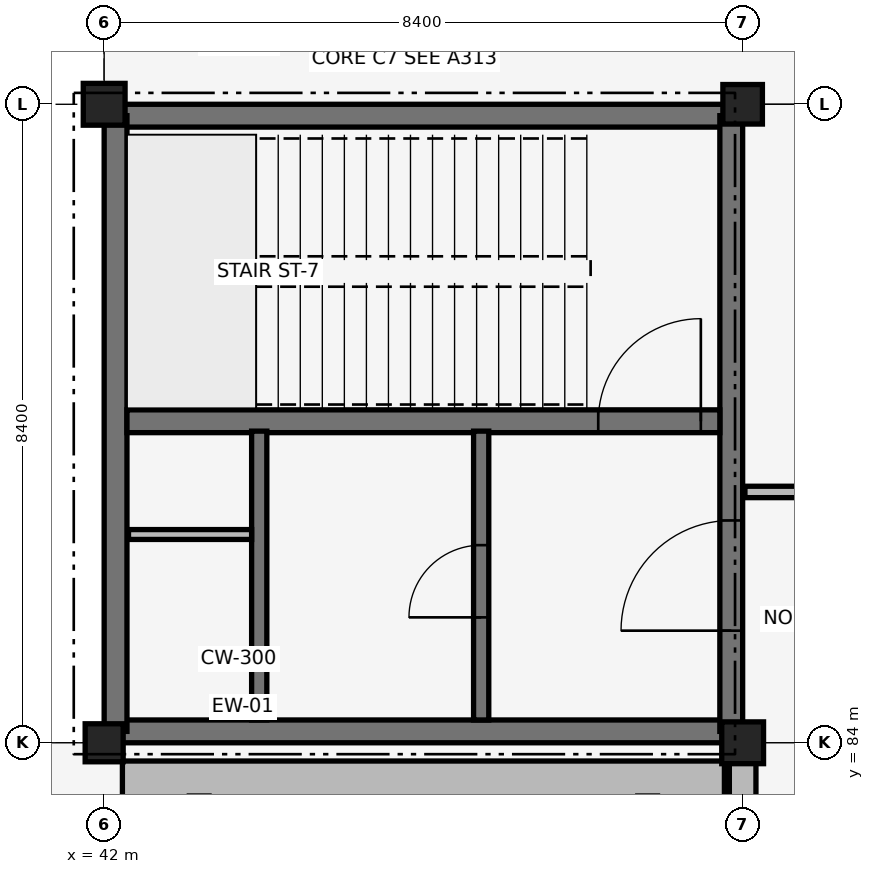
"""IFC4 building model, lengths in metres.
Left out: names, types, materials, properties, quantities, classifications, styles, units other than length and angle.
Written with IfcOpenShell. Run it as: python <this file> out.ifc"""

import sys

from ifc_helpers import new_model, si_unit, direction, frame, frame_2d, origin, origin_2d, place, context, subcontext, project, spatial, polyline, rectangle, outline, extrude, element, fill, save


model = new_model("IFC4")
c1 = context("Model", 3, precision=1e-05, world=origin(), true_north=direction((0.0, 1.0)))
c2 = subcontext(c1, "Body", "Model", "MODEL_VIEW")
j1 = project(units=[si_unit("LENGTHUNIT", "METRE"), si_unit("PLANEANGLEUNIT", "RADIAN")], contexts=[c1])
p1 = place(None, origin())
s1 = spatial("IfcSite", under=j1, at=p1, CompositionType="ELEMENT")
p2 = place(p1, origin())
s2 = spatial("IfcBuilding", under=s1, at=p2, CompositionType="ELEMENT")
p3 = place(p2, origin())
s3 = spatial("IfcBuildingStorey", under=s2, at=p3, CompositionType="ELEMENT", Elevation=0.0)
for number, where, z_axis, x_axis in (
    (1, (42.15, 84.15, 0.0), (0.0, 0.0, 1.0), (1.0, 0.0, 0.0)),
    (2, (42.15, 92.25, 0.0), (0.0, 0.0, 1.0), (1.0, 0.0, 0.0)),
    (3, (42.15, 84.15, 0.0), (0.0, 0.0, 1.0), (0.0, 1.0, 0.0)),
):
    element("IfcWall", number, at=place(p3, frame(where, z_axis=z_axis, x_axis=x_axis)), inside=s3, PredefinedType="SHEAR", context=c2, shape_type="SweptSolid", body=[
        extrude(rectangle(XDim=8.1, YDim=0.3, at=frame_2d((4.05, 0.0))), origin(), (0.0, 0.0, 1.0), 5.14),
    ])
p4 = place(p3, frame((50.25, 84.15, 0.0), z_axis=(0.0, 0.0, 1.0), x_axis=(0.0, 1.0, 0.0)))
e4 = element("IfcWall", 4, at=p4, inside=s3, PredefinedType="SHEAR", context=c2, shape_type="SweptSolid", body=[
    extrude(rectangle(XDim=8.1, YDim=0.3, at=frame_2d((4.05, 0.0))), origin(), (0.0, 0.0, 1.0), 5.14),
])
p5 = place(p4, frame((1.325, 0.0, 0.0)))
e5 = element("IfcOpeningElement", 5, at=p5, cuts=e4, PredefinedType="OPENING", context=c2, shape_type="SweptSolid", body=[
    extrude(rectangle(XDim=1.45, YDim=2.15, at=frame_2d((0.725, 1.075))), frame((0.0, 0.16, 0.0), z_axis=(0.0, -1.0, 0.0), x_axis=(1.0, 0.0, 0.0)), (0.0, 0.0, 1.0), 0.32),
])
p6 = place(p3, frame((42.3, 88.23, 0.0), z_axis=(0.0, 0.0, 1.0), x_axis=(1.0, 0.0, 0.0)))
e6 = element("IfcWall", 6, at=p6, inside=s3, PredefinedType="SHEAR", context=c2, shape_type="SweptSolid", body=[
    extrude(rectangle(XDim=7.8, YDim=0.3, at=frame_2d((3.9, 0.0))), origin(), (0.0, 0.0, 1.0), 5.14),
])
p7 = place(p6, frame((6.2, 0.0, 0.0)))
e7 = element("IfcOpeningElement", 7, at=p7, cuts=e6, PredefinedType="OPENING", context=c2, shape_type="SweptSolid", body=[
    extrude(rectangle(XDim=1.35, YDim=2.15, at=frame_2d((0.675, 1.075))), frame((0.0, 0.16, 0.0), z_axis=(0.0, -1.0, 0.0), x_axis=(1.0, 0.0, 0.0)), (0.0, 0.0, 1.0), 0.32),
])
p8 = place(p3, frame((42.0, 84.0, -0.32), z_axis=(0.0, 0.0, 1.0), x_axis=(1.0, 0.0, 0.0)))
e8 = element("IfcColumn", 8, at=p8, inside=s3, PredefinedType="COLUMN", context=c2, shape_type="SweptSolid", body=[
    extrude(rectangle(XDim=0.5, YDim=0.5, at=origin_2d()), origin(), (0.0, 0.0, 1.0), 5.46),
])
for number, where, z_axis, x_axis in (
    (9, (42.0, 92.4, -0.32), (0.0, 0.0, 1.0), (1.0, 0.0, 0.0)),
    (10, (50.4, 84.0, -0.32), (0.0, 0.0, 1.0), (1.0, 0.0, 0.0)),
):
    element("IfcColumn", number, at=place(p3, frame(where, z_axis=z_axis, x_axis=x_axis)), inside=s3, PredefinedType="COLUMN", context=c2, shape_type="SweptSolid", body=[
        extrude(rectangle(XDim=0.55, YDim=0.55, at=origin_2d()), origin(), (0.0, 0.0, 1.0), 5.46),
    ])
p9 = place(p3, frame((50.4, 92.4, -0.32), z_axis=(0.0, 0.0, 1.0), x_axis=(1.0, 0.0, 0.0)))
e11 = element("IfcColumn", 11, at=p9, inside=s3, PredefinedType="COLUMN", context=c2, shape_type="SweptSolid", body=[
    extrude(rectangle(XDim=0.52, YDim=0.52, at=origin_2d()), origin(), (0.0, 0.0, 1.0), 5.46),
])
p10 = place(p3, frame((50.4, 75.6, 5.145), z_axis=(0.0, 0.0, 1.0), x_axis=(0.0, 1.0, 0.0)))
e12 = element("IfcWall", 12, at=p10, inside=s3, PredefinedType="SOLIDWALL", context=c2, shape_type="SweptSolid", body=[
    extrude(outline(polyline([(0.0, 0.0), (8.4, 0.0), (8.4, 0.25), (4.2, 2.489), (0.0, 0.25), (0.0, 0.0)])), frame((0.0, 0.175, 0.0), z_axis=(0.0, -1.0, 0.0), x_axis=(1.0, 0.0, 0.0)), (0.0, 0.0, 1.0), 0.35),
])
p11 = place(p3, frame((42.24, 83.52, -0.25), z_axis=(0.0, 0.0, 1.0), x_axis=(1.0, 0.0, 0.0)))
e13 = element("IfcWall", 13, at=p11, inside=s3, PredefinedType="SOLIDWALL", context=c2, shape_type="SweptSolid", body=[
    extrude(rectangle(XDim=7.92, YDim=0.48, at=frame_2d((3.96, 0.0))), origin(), (0.0, 0.0, 1.0), 5.69),
])
p12 = place(p3, frame((46.96, 84.3, 0.0), z_axis=(0.0, 0.0, 1.0), x_axis=(0.0, 1.0, 0.0)))
e14 = element("IfcWall", 14, at=p12, inside=s3, PredefinedType="SHEAR", context=c2, shape_type="SweptSolid", body=[
    extrude(rectangle(XDim=3.8, YDim=0.2, at=frame_2d((1.9, 0.0))), origin(), (0.0, 0.0, 1.0), 4.4),
])
p13 = place(p12, frame((1.35, 0.0, 0.0)))
e15 = element("IfcOpeningElement", 15, at=p13, cuts=e14, PredefinedType="OPENING", context=c2, shape_type="SweptSolid", body=[
    extrude(rectangle(XDim=0.95, YDim=2.1, at=frame_2d((0.475, 1.05))), frame((0.0, 0.11, 0.0), z_axis=(0.0, -1.0, 0.0), x_axis=(1.0, 0.0, 0.0)), (0.0, 0.0, 1.0), 0.22),
])
p14 = place(p3, frame((44.04, 84.3, 0.0), z_axis=(0.0, 0.0, 1.0), x_axis=(0.0, 1.0, 0.0)))
e16 = element("IfcWall", 16, at=p14, inside=s3, PredefinedType="SHEAR", context=c2, shape_type="SweptSolid", body=[
    extrude(rectangle(XDim=3.8, YDim=0.2, at=frame_2d((1.9, 0.0))), origin(), (0.0, 0.0, 1.0), 4.4),
])
p15 = place(p3, frame((42.32, 86.74, 0.0), z_axis=(0.0, 0.0, 1.0), x_axis=(1.0, 0.0, 0.0)))
e17 = element("IfcWall", 17, at=p15, inside=s3, PredefinedType="PARTITIONING", context=c2, shape_type="SweptSolid", body=[
    extrude(rectangle(XDim=1.62, YDim=0.13, at=frame_2d((0.81, 0.0))), origin(), (0.0, 0.0, 1.0), 4.39),
])
p16 = place(p3, frame((50.43, 87.3, 0.0), z_axis=(0.0, 0.0, 1.0), x_axis=(1.0, 0.0, 0.0)))
e18 = element("IfcWall", 18, at=p16, inside=s3, PredefinedType="PARTITIONING", context=c2, shape_type="SweptSolid", body=[
    extrude(rectangle(XDim=20.62, YDim=0.15, at=frame_2d((10.31, 0.0))), origin(), (0.0, 0.0, 1.0), 4.49),
])
p17 = place(p16, frame((9.785, 0.0, 0.0)))
e19 = element("IfcOpeningElement", 19, at=p17, cuts=e18, PredefinedType="OPENING", context=c2, shape_type="SweptSolid", body=[
    extrude(rectangle(XDim=1.05, YDim=2.15, at=frame_2d((0.525, 1.075))), frame((0.0, 0.085, 0.0), z_axis=(0.0, -1.0, 0.0), x_axis=(1.0, 0.0, 0.0)), (0.0, 0.0, 1.0), 0.17),
])
p18 = place(p7, origin())
e20 = element("IfcDoor", 20, at=p18, inside=s3, OperationType="SINGLE_SWING_RIGHT", PredefinedType="DOOR", context=c2, shape_type="SweptSolid", body=[
    extrude(rectangle(XDim=1.35, YDim=2.15, at=frame_2d((0.675, 1.075))), frame((0.0, 0.025, 0.0), z_axis=(0.0, -1.0, 0.0), x_axis=(1.0, 0.0, 0.0)), (0.0, 0.0, 1.0), 0.05),
])
fill(e7, e20)
p19 = place(p13, origin())
e21 = element("IfcDoor", 21, at=p19, inside=s3, OperationType="SINGLE_SWING_LEFT", PredefinedType="DOOR", context=c2, shape_type="SweptSolid", body=[
    extrude(rectangle(XDim=0.95, YDim=2.1, at=frame_2d((0.475, 1.05))), frame((0.0, 0.025, 0.0), z_axis=(0.0, -1.0, 0.0), x_axis=(1.0, 0.0, 0.0)), (0.0, 0.0, 1.0), 0.05),
])
fill(e15, e21)
p20 = place(p5, origin())
e22 = element("IfcDoor", 22, at=p20, inside=s3, OperationType="DOUBLE_DOOR_SINGLE_SWING", PredefinedType="DOOR", context=c2, shape_type="SweptSolid", body=[
    extrude(rectangle(XDim=1.45, YDim=2.15, at=frame_2d((0.725, 1.075))), frame((0.0, 0.025, 0.0), z_axis=(0.0, -1.0, 0.0), x_axis=(1.0, 0.0, 0.0)), (0.0, 0.0, 1.0), 0.05),
])
fill(e5, e22)
save(model, sys.argv[1])
